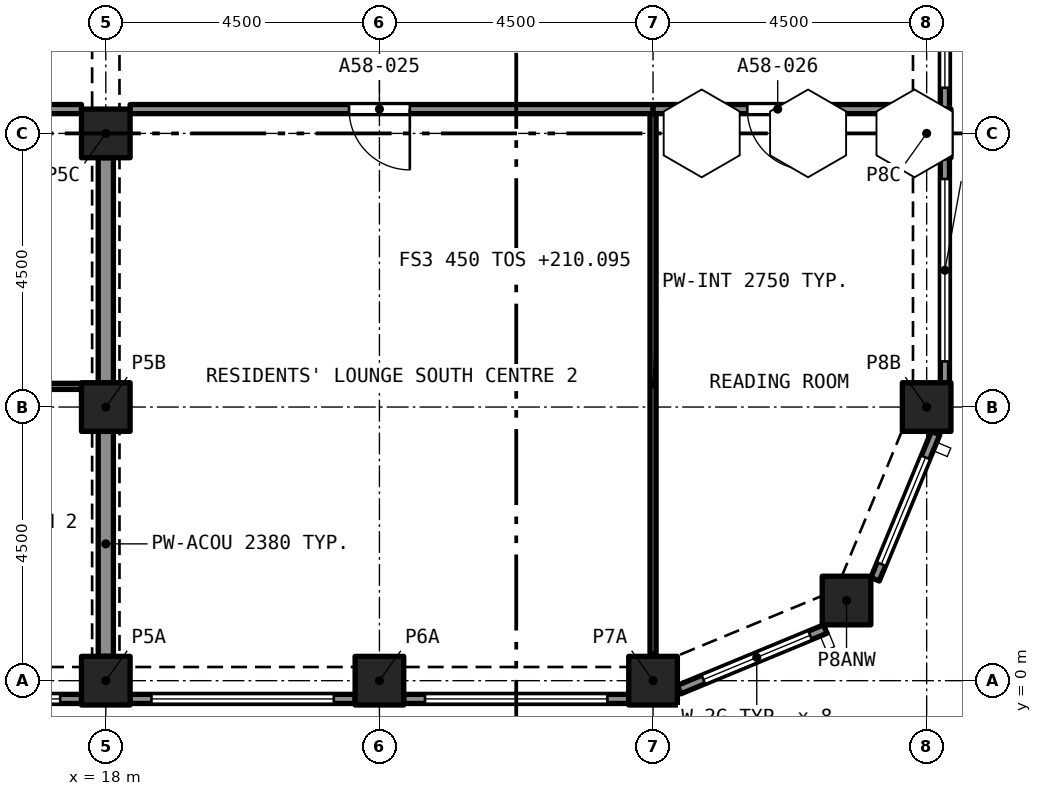
"""IFC4 building model, lengths in metres.
Left out: names, types, materials, properties, quantities, classifications, styles, units other than length and angle.
Written with IfcOpenShell. Run it as: python <this file> out.ifc"""

import sys

from ifc_helpers import new_model, si_unit, direction, frame, frame_2d, origin, origin_2d, place, context, subcontext, project, spatial, rectangle, extrude, element, fill, save


model = new_model("IFC4")
c1 = context("Model", 3, precision=1e-05, world=origin(), true_north=direction((0.0, 1.0)))
c2 = subcontext(c1, "Body", "Model", "MODEL_VIEW")
j1 = project(units=[si_unit("LENGTHUNIT", "METRE"), si_unit("PLANEANGLEUNIT", "RADIAN")], contexts=[c1])
p1 = place(None, origin())
s1 = spatial("IfcSite", under=j1, at=p1, CompositionType="ELEMENT")
p2 = place(p1, origin())
s2 = spatial("IfcBuilding", under=s1, at=p2, CompositionType="ELEMENT")
p3 = place(p2, frame((0.0, 0.0, 210.095)))
s3 = spatial("IfcBuildingStorey", under=s2, at=p3, CompositionType="ELEMENT", Elevation=210.095)
for number, where, z_axis, x_axis in (
    (1, (18.0, 0.0, 0.0), (0.0, 0.0, 1.0), (1.0, 0.0, 0.0)),
    (2, (22.5, 0.0, 0.0), (0.0, 0.0, 1.0), (1.0, 0.0, 0.0)),
    (3, (27.0, 0.0, 0.0), (0.0, 0.0, 1.0), (1.0, 0.0, 0.0)),
    (4, (30.182, 1.318, 0.0), (0.0, 0.0, 1.0), (1.0, 0.0, 0.0)),
    (5, (18.0, 4.5, 0.0), (0.0, 0.0, 1.0), (1.0, 0.0, 0.0)),
    (6, (31.5, 4.5, 0.0), (0.0, 0.0, 1.0), (1.0, 0.0, 0.0)),
    (7, (18.0, 9.0, 0.0), (0.0, 0.0, 1.0), (1.0, 0.0, 0.0)),
    (8, (31.5, 9.0, 0.0), (0.0, 0.0, 1.0), (1.0, 0.0, 0.0)),
):
    element("IfcColumn", number, at=place(p3, frame(where, z_axis=z_axis, x_axis=x_axis)), inside=s3, PredefinedType="COLUMN", context=c2, shape_type="SweptSolid", body=[
        extrude(rectangle(XDim=0.8, YDim=0.8, at=origin_2d()), origin(), (0.0, 0.0, 1.0), 3.2),
    ])
p4 = place(p3, frame((29.833, 0.849, 0.0), z_axis=(0.0, 0.0, 1.0), x_axis=(-0.923885342263, -0.382669406082, 0.0)))
e9 = element("IfcWall", 9, at=p4, inside=s3, PredefinedType="SOLIDWALL", context=c2, shape_type="SweptSolid", body=[
    extrude(rectangle(XDim=2.602, YDim=0.15, at=frame_2d((1.301, 0.0))), origin(), (0.0, 0.0, 1.0), 3.2),
])
p5 = place(p4, frame((0.27, 0.0, 0.45)))
e10 = element("IfcOpeningElement", 10, at=p5, cuts=e9, PredefinedType="OPENING", context=c2, shape_type="SweptSolid", body=[
    extrude(rectangle(XDim=1.9, YDim=1.95, at=frame_2d((0.95, 0.975))), frame((0.0, 0.085, 0.0), z_axis=(0.0, -1.0, 0.0), x_axis=(1.0, 0.0, 0.0)), (0.0, 0.0, 1.0), 0.17),
])
p6 = place(p3, frame((31.647, 4.071, 0.0), z_axis=(0.0, 0.0, 1.0), x_axis=(-0.382669406082, -0.923885342263, 0.0)))
e11 = element("IfcWall", 11, at=p6, inside=s3, PredefinedType="SOLIDWALL", context=c2, shape_type="SweptSolid", body=[
    extrude(rectangle(XDim=2.602, YDim=0.15, at=frame_2d((1.301, 0.0))), origin(), (0.0, 0.0, 1.0), 3.2),
])
p7 = place(p6, frame((0.432, 0.0, 0.45)))
e12 = element("IfcOpeningElement", 12, at=p7, cuts=e11, PredefinedType="OPENING", context=c2, shape_type="SweptSolid", body=[
    extrude(rectangle(XDim=1.9, YDim=1.95, at=frame_2d((0.95, 0.975))), frame((0.0, 0.085, 0.0), z_axis=(0.0, -1.0, 0.0), x_axis=(1.0, 0.0, 0.0)), (0.0, 0.0, 1.0), 0.17),
])
p8 = place(p3, frame((31.8, 8.6, 0.0), z_axis=(0.0, 0.0, 1.0), x_axis=(0.0, -1.0, 0.0)))
e13 = element("IfcWall", 13, at=p8, inside=s3, PredefinedType="SOLIDWALL", context=c2, shape_type="SweptSolid", body=[
    extrude(rectangle(XDim=3.7, YDim=0.15, at=frame_2d((1.85, 0.0))), origin(), (0.0, 0.0, 1.0), 3.2),
])
p9 = place(p8, frame((0.35, 0.0, 0.45)))
e14 = element("IfcOpeningElement", 14, at=p9, cuts=e13, PredefinedType="OPENING", context=c2, shape_type="SweptSolid", body=[
    extrude(rectangle(XDim=3.0, YDim=1.95, at=frame_2d((1.5, 0.975))), frame((0.0, 0.085, 0.0), z_axis=(0.0, -1.0, 0.0), x_axis=(1.0, 0.0, 0.0)), (0.0, 0.0, 1.0), 0.17),
])
p10 = place(p3, frame((31.8, 13.1, 0.0), z_axis=(0.0, 0.0, 1.0), x_axis=(0.0, -1.0, 0.0)))
e15 = element("IfcWall", 15, at=p10, inside=s3, PredefinedType="SOLIDWALL", context=c2, shape_type="SweptSolid", body=[
    extrude(rectangle(XDim=3.7, YDim=0.15, at=frame_2d((1.85, 0.0))), origin(), (0.0, 0.0, 1.0), 3.2),
])
p11 = place(p10, frame((0.35, 0.0, 0.45)))
e16 = element("IfcOpeningElement", 16, at=p11, cuts=e15, PredefinedType="OPENING", context=c2, shape_type="SweptSolid", body=[
    extrude(rectangle(XDim=3.0, YDim=1.95, at=frame_2d((1.5, 0.975))), frame((0.0, 0.085, 0.0), z_axis=(0.0, -1.0, 0.0), x_axis=(1.0, 0.0, 0.0)), (0.0, 0.0, 1.0), 0.17),
])
p12 = place(p3, frame((17.6, -0.3, 0.0), z_axis=(0.0, 0.0, 1.0), x_axis=(-1.0, 0.0, 0.0)))
e17 = element("IfcWall", 17, at=p12, inside=s3, PredefinedType="SOLIDWALL", context=c2, shape_type="SweptSolid", body=[
    extrude(rectangle(XDim=3.7, YDim=0.15, at=frame_2d((1.85, 0.0))), origin(), (0.0, 0.0, 1.0), 3.2),
])
p13 = place(p12, frame((0.35, 0.0, 0.45)))
e18 = element("IfcOpeningElement", 18, at=p13, cuts=e17, PredefinedType="OPENING", context=c2, shape_type="SweptSolid", body=[
    extrude(rectangle(XDim=3.0, YDim=1.95, at=frame_2d((1.5, 0.975))), frame((0.0, 0.085, 0.0), z_axis=(0.0, -1.0, 0.0), x_axis=(1.0, 0.0, 0.0)), (0.0, 0.0, 1.0), 0.17),
])
p14 = place(p3, frame((22.1, -0.3, 0.0), z_axis=(0.0, 0.0, 1.0), x_axis=(-1.0, 0.0, 0.0)))
e19 = element("IfcWall", 19, at=p14, inside=s3, PredefinedType="SOLIDWALL", context=c2, shape_type="SweptSolid", body=[
    extrude(rectangle(XDim=3.7, YDim=0.15, at=frame_2d((1.85, 0.0))), origin(), (0.0, 0.0, 1.0), 3.2),
])
p15 = place(p14, frame((0.35, 0.0, 0.45)))
e20 = element("IfcOpeningElement", 20, at=p15, cuts=e19, PredefinedType="OPENING", context=c2, shape_type="SweptSolid", body=[
    extrude(rectangle(XDim=3.0, YDim=1.95, at=frame_2d((1.5, 0.975))), frame((0.0, 0.085, 0.0), z_axis=(0.0, -1.0, 0.0), x_axis=(1.0, 0.0, 0.0)), (0.0, 0.0, 1.0), 0.17),
])
p16 = place(p3, frame((26.6, -0.3, 0.0), z_axis=(0.0, 0.0, 1.0), x_axis=(-1.0, 0.0, 0.0)))
e21 = element("IfcWall", 21, at=p16, inside=s3, PredefinedType="SOLIDWALL", context=c2, shape_type="SweptSolid", body=[
    extrude(rectangle(XDim=3.7, YDim=0.15, at=frame_2d((1.85, 0.0))), origin(), (0.0, 0.0, 1.0), 3.2),
])
p17 = place(p16, frame((0.35, 0.0, 0.45)))
e22 = element("IfcOpeningElement", 22, at=p17, cuts=e21, PredefinedType="OPENING", context=c2, shape_type="SweptSolid", body=[
    extrude(rectangle(XDim=3.0, YDim=1.95, at=frame_2d((1.5, 0.975))), frame((0.0, 0.085, 0.0), z_axis=(0.0, -1.0, 0.0), x_axis=(1.0, 0.0, 0.0)), (0.0, 0.0, 1.0), 0.17),
])
p18 = place(p3, frame((17.6, 4.84, 0.0), z_axis=(0.0, 0.0, 1.0), x_axis=(-1.0, 0.0, 0.0)))
e23 = element("IfcWall", 23, at=p18, inside=s3, PredefinedType="PARTITIONING", context=c2, shape_type="SweptSolid", body=[
    extrude(rectangle(XDim=4.1, YDim=0.1, at=frame_2d((2.05, 0.0))), origin(), (0.0, 0.0, 1.0), 2.9),
])
p19 = place(p18, frame((1.4, 0.0, 0.0)))
e24 = element("IfcOpeningElement", 24, at=p19, cuts=e23, PredefinedType="OPENING", context=c2, shape_type="SweptSolid", body=[
    extrude(rectangle(XDim=0.9, YDim=2.1, at=frame_2d((0.45, 1.05))), frame((0.0, 0.06, 0.0), z_axis=(0.0, -1.0, 0.0), x_axis=(1.0, 0.0, 0.0)), (0.0, 0.0, 1.0), 0.12),
])
for number, where, z_axis, x_axis in (
    (25, (18.0, 0.4, 0.0), (0.0, 0.0, 1.0), (0.0, 1.0, 0.0)),
    (26, (18.0, 4.9, 0.0), (0.0, 0.0, 1.0), (0.0, 1.0, 0.0)),
):
    element("IfcWall", number, at=place(p3, frame(where, z_axis=z_axis, x_axis=x_axis)), inside=s3, PredefinedType="PARTITIONING", context=c2, shape_type="SweptSolid", body=[
        extrude(rectangle(XDim=3.7, YDim=0.25, at=frame_2d((1.85, 0.0))), origin(), (0.0, 0.0, 1.0), 2.38),
    ])
p20 = place(p3, frame((17.6, 9.4, 0.0), z_axis=(0.0, 0.0, 1.0), x_axis=(-1.0, 0.0, 0.0)))
e27 = element("IfcWall", 27, at=p20, inside=s3, PredefinedType="PARTITIONING", context=c2, shape_type="SweptSolid", body=[
    extrude(rectangle(XDim=2.65, YDim=0.15, at=frame_2d((1.325, 0.0))), origin(), (0.0, 0.0, 1.0), 2.9),
])
p21 = place(p20, frame((1.25, 0.0, 0.0)))
e28 = element("IfcOpeningElement", 28, at=p21, cuts=e27, PredefinedType="OPENING", context=c2, shape_type="SweptSolid", body=[
    extrude(rectangle(XDim=1.2, YDim=2.4, at=frame_2d((0.6, 1.2))), frame((0.0, 0.085, 0.0), z_axis=(0.0, -1.0, 0.0), x_axis=(1.0, 0.0, 0.0)), (0.0, 0.0, 1.0), 0.17),
])
p22 = place(p3, frame((27.0, 0.433, 0.0), z_axis=(0.0, 0.0, 1.0), x_axis=(0.0, 1.0, 0.0)))
e29 = element("IfcWall", 29, at=p22, inside=s3, PredefinedType="PARTITIONING", context=c2, shape_type="SweptSolid", body=[
    extrude(rectangle(XDim=8.892, YDim=0.1, at=frame_2d((4.446, 0.0))), origin(), (0.0, 0.0, 1.0), 2.75),
])
p23 = place(p3, frame((27.0, 9.4, 0.0), z_axis=(0.0, 0.0, 1.0), x_axis=(-1.0, 0.0, 0.0)))
e30 = element("IfcWall", 30, at=p23, inside=s3, PredefinedType="PARTITIONING", context=c2, shape_type="SweptSolid", body=[
    extrude(rectangle(XDim=8.6, YDim=0.15, at=frame_2d((4.3, 0.0))), origin(), (0.0, 0.0, 1.0), 2.75),
])
p24 = place(p23, frame((4.0, 0.0, 0.0)))
e31 = element("IfcOpeningElement", 31, at=p24, cuts=e30, PredefinedType="OPENING", context=c2, shape_type="SweptSolid", body=[
    extrude(rectangle(XDim=1.0, YDim=2.1, at=frame_2d((0.5, 1.05))), frame((0.0, 0.085, 0.0), z_axis=(0.0, -1.0, 0.0), x_axis=(1.0, 0.0, 0.0)), (0.0, 0.0, 1.0), 0.17),
])
p25 = place(p3, frame((31.1, 9.4, 0.0), z_axis=(0.0, 0.0, 1.0), x_axis=(-1.0, 0.0, 0.0)))
e32 = element("IfcWall", 32, at=p25, inside=s3, PredefinedType="PARTITIONING", context=c2, shape_type="SweptSolid", body=[
    extrude(rectangle(XDim=4.1, YDim=0.15, at=frame_2d((2.05, 0.0))), origin(), (0.0, 0.0, 1.0), 2.75),
])
p26 = place(p25, frame((1.55, 0.0, 0.0)))
e33 = element("IfcOpeningElement", 33, at=p26, cuts=e32, PredefinedType="OPENING", context=c2, shape_type="SweptSolid", body=[
    extrude(rectangle(XDim=1.0, YDim=2.1, at=frame_2d((0.5, 1.05))), frame((0.0, 0.085, 0.0), z_axis=(0.0, -1.0, 0.0), x_axis=(1.0, 0.0, 0.0)), (0.0, 0.0, 1.0), 0.17),
])
p27 = place(p5, origin())
e34 = element("IfcWindow", 34, at=p27, inside=s3, PartitioningType="SINGLE_PANEL", PredefinedType="WINDOW", context=c2, shape_type="SweptSolid", body=[
    extrude(rectangle(XDim=1.9, YDim=1.95, at=frame_2d((0.95, 0.975))), frame((0.0, 0.03, 0.0), z_axis=(0.0, -1.0, 0.0), x_axis=(1.0, 0.0, 0.0)), (0.0, 0.0, 1.0), 0.06),
])
fill(e10, e34)
p28 = place(p7, origin())
e35 = element("IfcWindow", 35, at=p28, inside=s3, PartitioningType="SINGLE_PANEL", PredefinedType="WINDOW", context=c2, shape_type="SweptSolid", body=[
    extrude(rectangle(XDim=1.9, YDim=1.95, at=frame_2d((0.95, 0.975))), frame((0.0, 0.03, 0.0), z_axis=(0.0, -1.0, 0.0), x_axis=(1.0, 0.0, 0.0)), (0.0, 0.0, 1.0), 0.06),
])
fill(e12, e35)
p29 = place(p9, origin())
e36 = element("IfcWindow", 36, at=p29, inside=s3, PartitioningType="SINGLE_PANEL", PredefinedType="WINDOW", context=c2, shape_type="SweptSolid", body=[
    extrude(rectangle(XDim=3.0, YDim=1.95, at=frame_2d((1.5, 0.975))), frame((0.0, 0.03, 0.0), z_axis=(0.0, -1.0, 0.0), x_axis=(1.0, 0.0, 0.0)), (0.0, 0.0, 1.0), 0.06),
])
fill(e14, e36)
p30 = place(p11, origin())
e37 = element("IfcWindow", 37, at=p30, inside=s3, PartitioningType="SINGLE_PANEL", PredefinedType="WINDOW", context=c2, shape_type="SweptSolid", body=[
    extrude(rectangle(XDim=3.0, YDim=1.95, at=frame_2d((1.5, 0.975))), frame((0.0, 0.03, 0.0), z_axis=(0.0, -1.0, 0.0), x_axis=(1.0, 0.0, 0.0)), (0.0, 0.0, 1.0), 0.06),
])
fill(e16, e37)
p31 = place(p13, origin())
e38 = element("IfcWindow", 38, at=p31, inside=s3, PartitioningType="SINGLE_PANEL", PredefinedType="WINDOW", context=c2, shape_type="SweptSolid", body=[
    extrude(rectangle(XDim=3.0, YDim=1.95, at=frame_2d((1.5, 0.975))), frame((0.0, 0.03, 0.0), z_axis=(0.0, -1.0, 0.0), x_axis=(1.0, 0.0, 0.0)), (0.0, 0.0, 1.0), 0.06),
])
fill(e18, e38)
p32 = place(p15, origin())
e39 = element("IfcWindow", 39, at=p32, inside=s3, PartitioningType="SINGLE_PANEL", PredefinedType="WINDOW", context=c2, shape_type="SweptSolid", body=[
    extrude(rectangle(XDim=3.0, YDim=1.95, at=frame_2d((1.5, 0.975))), frame((0.0, 0.03, 0.0), z_axis=(0.0, -1.0, 0.0), x_axis=(1.0, 0.0, 0.0)), (0.0, 0.0, 1.0), 0.06),
])
fill(e20, e39)
p33 = place(p17, origin())
e40 = element("IfcWindow", 40, at=p33, inside=s3, PartitioningType="SINGLE_PANEL", PredefinedType="WINDOW", context=c2, shape_type="SweptSolid", body=[
    extrude(rectangle(XDim=3.0, YDim=1.95, at=frame_2d((1.5, 0.975))), frame((0.0, 0.03, 0.0), z_axis=(0.0, -1.0, 0.0), x_axis=(1.0, 0.0, 0.0)), (0.0, 0.0, 1.0), 0.06),
])
fill(e22, e40)
p34 = place(p24, origin())
e41 = element("IfcDoor", 41, at=p34, inside=s3, OperationType="SINGLE_SWING_RIGHT", PredefinedType="DOOR", context=c2, shape_type="SweptSolid", body=[
    extrude(rectangle(XDim=1.0, YDim=2.1, at=frame_2d((0.5, 1.05))), frame((0.0, 0.025, 0.0), z_axis=(0.0, -1.0, 0.0), x_axis=(1.0, 0.0, 0.0)), (0.0, 0.0, 1.0), 0.05),
])
fill(e31, e41)
p35 = place(p26, origin())
e42 = element("IfcDoor", 42, at=p35, inside=s3, OperationType="SINGLE_SWING_RIGHT", PredefinedType="DOOR", context=c2, shape_type="SweptSolid", body=[
    extrude(rectangle(XDim=1.0, YDim=2.1, at=frame_2d((0.5, 1.05))), frame((0.0, 0.025, 0.0), z_axis=(0.0, -1.0, 0.0), x_axis=(1.0, 0.0, 0.0)), (0.0, 0.0, 1.0), 0.05),
])
fill(e33, e42)
save(model, sys.argv[1])
